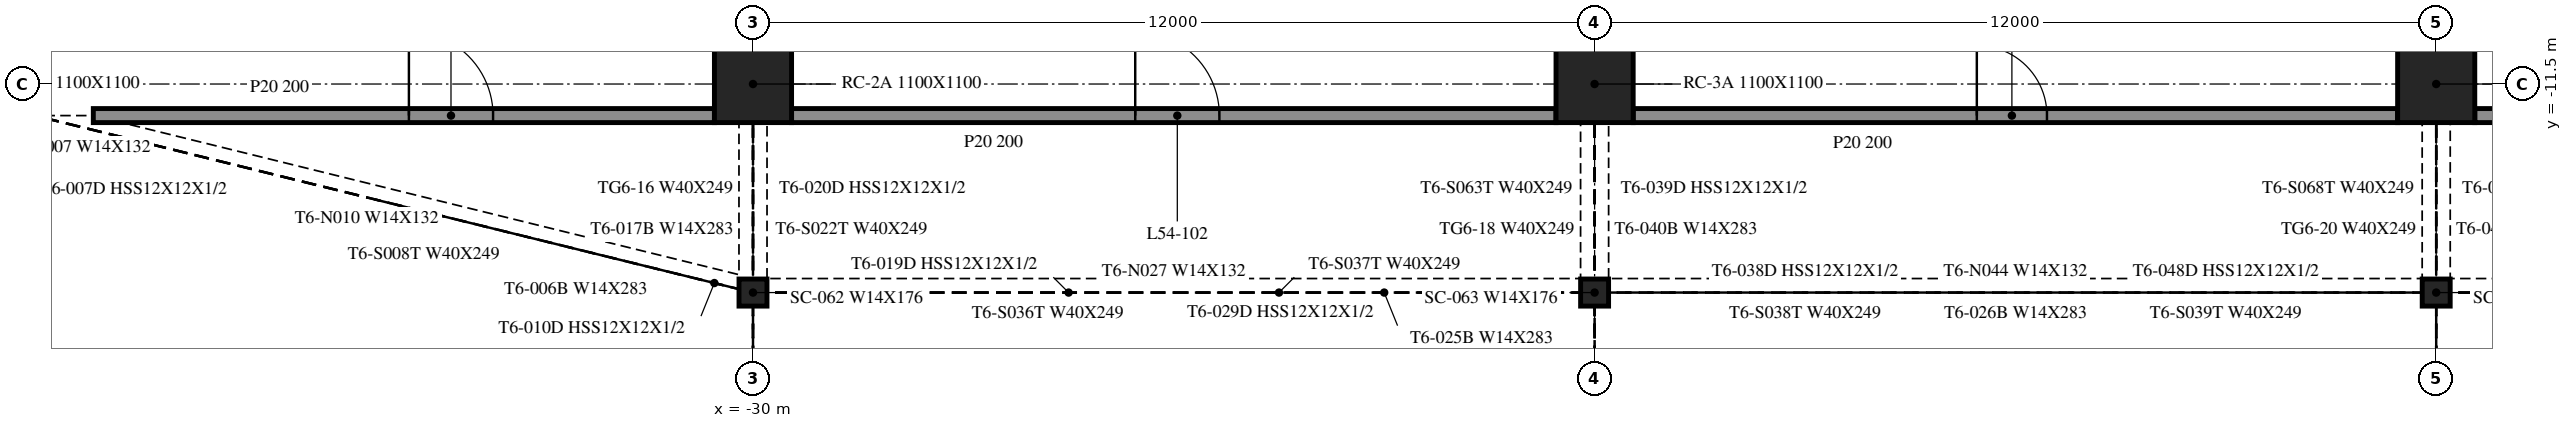
"""IFC4 building model, lengths in metres.
Left out: names, types, materials, properties, quantities, classifications, styles, units other than length and angle.
Written with IfcOpenShell. Run it as: python <this file> out.ifc"""

import sys

from ifc_helpers import new_model, si_unit, direction, frame, frame_2d, origin, origin_2d, place, context, subcontext, project, spatial, rectangle, i_section, extrude, element, fill, save


model = new_model("IFC4")
c1 = context("Model", 3, precision=1e-05, world=origin(), true_north=direction((0.0, 1.0)))
c2 = subcontext(c1, "Body", "Model", "MODEL_VIEW")
j1 = project(units=[si_unit("LENGTHUNIT", "METRE"), si_unit("PLANEANGLEUNIT", "RADIAN")], contexts=[c1])
p1 = place(None, origin())
s1 = spatial("IfcSite", under=j1, at=p1, CompositionType="ELEMENT")
p2 = place(p1, origin())
s2 = spatial("IfcBuilding", under=s1, at=p2, CompositionType="ELEMENT")
p3 = place(p2, frame((0.0, 0.0, 224.3)))
s3 = spatial("IfcBuildingStorey", under=s2, at=p3, CompositionType="ELEMENT", Elevation=224.3)
for number, where, z_axis, x_axis in (
    (1, (-30.0, -11.5, -0.4), (0.0, 0.0, 1.0), (1.0, 0.0, 0.0)),
    (2, (-18.0, -11.5, -0.4), (0.0, 0.0, 1.0), (1.0, 0.0, 0.0)),
    (3, (-6.0, -11.5, -0.4), (0.0, 0.0, 1.0), (1.0, 0.0, 0.0)),
):
    element("IfcColumn", number, at=place(p3, frame(where, z_axis=z_axis, x_axis=x_axis)), inside=s3, PredefinedType="COLUMN", context=c2, shape_type="SweptSolid", body=[
        extrude(rectangle(XDim=1.1, YDim=1.1, at=origin_2d()), origin(), (0.0, 0.0, 1.0), 4.36),
    ])
for number, where, z_axis, x_axis in (
    (4, (-30.0, -14.473, -0.4), (0.0, 0.0, 1.0), (1.0, 0.0, 0.0)),
    (5, (-18.0, -14.473, -0.4), (0.0, 0.0, 1.0), (1.0, 0.0, 0.0)),
    (6, (-6.0, -14.473, -0.4), (0.0, 0.0, 1.0), (1.0, 0.0, 0.0)),
):
    element("IfcColumn", number, at=place(p3, frame(where, z_axis=z_axis, x_axis=x_axis)), inside=s3, PredefinedType="COLUMN", context=c2, shape_type="SweptSolid", body=[
        extrude(i_section(OverallWidth=0.399, OverallDepth=0.386, WebThickness=0.021, FlangeThickness=0.033, at=origin_2d()), origin(), (0.0, 0.0, 1.0), 4.36),
    ])
p4 = place(p3, frame((-39.406, -11.95, 0.0), z_axis=(0.0, 0.0, 1.0), x_axis=(1.0, 0.0, 0.0)))
e7 = element("IfcWall", 7, at=p4, inside=s3, PredefinedType="PARTITIONING", context=c2, shape_type="SweptSolid", body=[
    extrude(rectangle(XDim=8.856, YDim=0.2, at=frame_2d((4.428, 0.0))), origin(), (0.0, 0.0, 1.0), 3.96),
])
p5 = place(p4, frame((4.5, 0.0, 0.0)))
e8 = element("IfcOpeningElement", 8, at=p5, cuts=e7, PredefinedType="OPENING", context=c2, shape_type="SweptSolid", body=[
    extrude(rectangle(XDim=1.2, YDim=2.1, at=frame_2d((0.6, 1.05))), frame((0.0, 0.11, 0.0), z_axis=(0.0, -1.0, 0.0), x_axis=(1.0, 0.0, 0.0)), (0.0, 0.0, 1.0), 0.22),
])
p6 = place(p3, frame((-29.45, -11.95, 0.0), z_axis=(0.0, 0.0, 1.0), x_axis=(1.0, 0.0, 0.0)))
e9 = element("IfcWall", 9, at=p6, inside=s3, PredefinedType="PARTITIONING", context=c2, shape_type="SweptSolid", body=[
    extrude(rectangle(XDim=10.9, YDim=0.2, at=frame_2d((5.45, 0.0))), origin(), (0.0, 0.0, 1.0), 3.96),
])
p7 = place(p6, frame((4.9, 0.0, 0.0)))
e10 = element("IfcOpeningElement", 10, at=p7, cuts=e9, PredefinedType="OPENING", context=c2, shape_type="SweptSolid", body=[
    extrude(rectangle(XDim=1.2, YDim=2.1, at=frame_2d((0.6, 1.05))), frame((0.0, 0.11, 0.0), z_axis=(0.0, -1.0, 0.0), x_axis=(1.0, 0.0, 0.0)), (0.0, 0.0, 1.0), 0.22),
])
p8 = place(p3, frame((-17.45, -11.95, 0.0), z_axis=(0.0, 0.0, 1.0), x_axis=(1.0, 0.0, 0.0)))
e11 = element("IfcWall", 11, at=p8, inside=s3, PredefinedType="PARTITIONING", context=c2, shape_type="SweptSolid", body=[
    extrude(rectangle(XDim=10.9, YDim=0.2, at=frame_2d((5.45, 0.0))), origin(), (0.0, 0.0, 1.0), 3.96),
])
p9 = place(p8, frame((4.9, 0.0, 0.0)))
e12 = element("IfcOpeningElement", 12, at=p9, cuts=e11, PredefinedType="OPENING", context=c2, shape_type="SweptSolid", body=[
    extrude(rectangle(XDim=1.0, YDim=2.1, at=frame_2d((0.5, 1.05))), frame((0.0, 0.11, 0.0), z_axis=(0.0, -1.0, 0.0), x_axis=(1.0, 0.0, 0.0)), (0.0, 0.0, 1.0), 0.22),
])
p10 = place(p3, frame((-5.45, -11.95, 0.0), z_axis=(0.0, 0.0, 1.0), x_axis=(1.0, 0.0, 0.0)))
e13 = element("IfcWall", 13, at=p10, inside=s3, PredefinedType="PARTITIONING", context=c2, shape_type="SweptSolid", body=[
    extrude(rectangle(XDim=10.9, YDim=0.2, at=frame_2d((5.45, 0.0))), origin(), (0.0, 0.0, 1.0), 3.96),
])
p11 = place(p10, frame((4.9, 0.0, 0.0)))
e14 = element("IfcOpeningElement", 14, at=p11, cuts=e13, PredefinedType="OPENING", context=c2, shape_type="SweptSolid", body=[
    extrude(rectangle(XDim=1.0, YDim=2.1, at=frame_2d((0.5, 1.05))), frame((0.0, 0.11, 0.0), z_axis=(0.0, -1.0, 0.0), x_axis=(1.0, 0.0, 0.0)), (0.0, 0.0, 1.0), 0.22),
])
p12 = place(p5, origin())
e15 = element("IfcDoor", 15, at=p12, inside=s3, OperationType="SINGLE_SWING_LEFT", PredefinedType="DOOR", context=c2, shape_type="SweptSolid", body=[
    extrude(rectangle(XDim=1.2, YDim=2.1, at=frame_2d((0.6, 1.05))), frame((0.0, 0.025, 0.0), z_axis=(0.0, -1.0, 0.0), x_axis=(1.0, 0.0, 0.0)), (0.0, 0.0, 1.0), 0.05),
])
fill(e8, e15)
p13 = place(p7, origin())
e16 = element("IfcDoor", 16, at=p13, inside=s3, OperationType="SINGLE_SWING_LEFT", PredefinedType="DOOR", context=c2, shape_type="SweptSolid", body=[
    extrude(rectangle(XDim=1.2, YDim=2.1, at=frame_2d((0.6, 1.05))), frame((0.0, 0.025, 0.0), z_axis=(0.0, -1.0, 0.0), x_axis=(1.0, 0.0, 0.0)), (0.0, 0.0, 1.0), 0.05),
])
fill(e10, e16)
p14 = place(p9, origin())
e17 = element("IfcDoor", 17, at=p14, inside=s3, OperationType="SINGLE_SWING_RIGHT", PredefinedType="DOOR", context=c2, shape_type="SweptSolid", body=[
    extrude(rectangle(XDim=1.0, YDim=2.1, at=frame_2d((0.5, 1.05))), frame((0.0, 0.025, 0.0), z_axis=(0.0, -1.0, 0.0), x_axis=(1.0, 0.0, 0.0)), (0.0, 0.0, 1.0), 0.05),
])
fill(e12, e17)
save(model, sys.argv[1])
